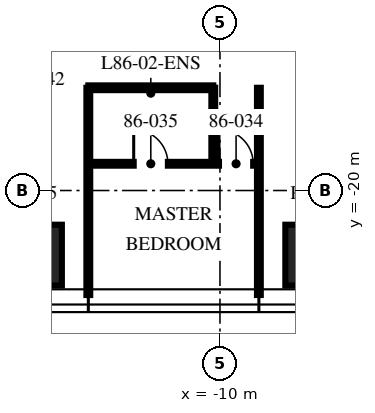
"""IFC4 building model, lengths in metres.
Left out: names, types, materials, properties, quantities, classifications, styles, units other than length and angle.
Written with IfcOpenShell. Run it as: python <this file> out.ifc"""

import sys

from ifc_helpers import new_model, si_unit, direction, frame, frame_2d, origin, origin_2d, place, context, subcontext, project, spatial, rectangle, extrude, element, fill, save


model = new_model("IFC4")
c1 = context("Model", 3, precision=1e-05, world=origin(), true_north=direction((0.0, 1.0)))
c2 = subcontext(c1, "Body", "Model", "MODEL_VIEW")
j1 = project(units=[si_unit("LENGTHUNIT", "METRE"), si_unit("PLANEANGLEUNIT", "RADIAN")], contexts=[c1])
p1 = place(None, origin())
s1 = spatial("IfcSite", under=j1, at=p1, CompositionType="ELEMENT")
p2 = place(p1, origin())
s2 = spatial("IfcBuilding", under=s1, at=p2, CompositionType="ELEMENT")
p3 = place(p2, frame((0.0, 0.0, 342.0)))
s3 = spatial("IfcBuildingStorey", under=s2, at=p3, CompositionType="ELEMENT", Elevation=342.0)
for number, where, z_axis, x_axis in (
    (1, (-7.48, -21.7, 0.0), (0.0, 0.0, 1.0), (1.0, 0.0, 0.0)),
    (2, (-14.96, -21.7, 0.0), (0.0, 0.0, 1.0), (1.0, 0.0, 0.0)),
):
    element("IfcColumn", number, at=place(p3, frame(where, z_axis=z_axis, x_axis=x_axis)), inside=s3, PredefinedType="COLUMN", context=c2, shape_type="SweptSolid", body=[
        extrude(rectangle(XDim=1.6, YDim=1.6, at=origin_2d()), origin(), (0.0, 0.0, 1.0), 3.75),
    ])
for number, where, z_axis, x_axis in (
    (3, (-13.464, -17.296, 0.0), (0.0, 0.0, 1.0), (0.0, -1.0, 0.0)),
    (4, (-8.976, -17.296, 0.0), (0.0, 0.0, 1.0), (0.0, -1.0, 0.0)),
):
    element("IfcWall", number, at=place(p3, frame(where, z_axis=z_axis, x_axis=x_axis)), inside=s3, PredefinedType="PARTITIONING", context=c2, shape_type="SweptSolid", body=[
        extrude(rectangle(XDim=5.454, YDim=0.1, at=frame_2d((2.727, 0.0))), origin(), (0.0, 0.0, 1.0), 3.01),
    ])
p4 = place(p3, frame((-13.464, -19.296, 0.0), z_axis=(0.0, 0.0, 1.0), x_axis=(1.0, 0.0, 0.0)))
e5 = element("IfcWall", 5, at=p4, inside=s3, PredefinedType="PARTITIONING", context=c2, shape_type="SweptSolid", body=[
    extrude(rectangle(XDim=4.488, YDim=0.1, at=frame_2d((2.244, 0.0))), origin(), (0.0, 0.0, 1.0), 2.91),
])
p5 = place(p4, frame((3.438, 0.0, 0.0)))
e6 = element("IfcOpeningElement", 6, at=p5, cuts=e5, PredefinedType="OPENING", context=c2, shape_type="SweptSolid", body=[
    extrude(rectangle(XDim=0.9, YDim=2.1, at=frame_2d((0.45, 1.05))), frame((0.0, 0.06, 0.0), z_axis=(0.0, -1.0, 0.0), x_axis=(1.0, 0.0, 0.0)), (0.0, 0.0, 1.0), 0.12),
])
p6 = place(p4, frame((1.194, 0.0, 0.0)))
e7 = element("IfcOpeningElement", 7, at=p6, cuts=e5, PredefinedType="OPENING", context=c2, shape_type="SweptSolid", body=[
    extrude(rectangle(XDim=0.9, YDim=2.1, at=frame_2d((0.45, 1.05))), frame((0.0, 0.06, 0.0), z_axis=(0.0, -1.0, 0.0), x_axis=(1.0, 0.0, 0.0)), (0.0, 0.0, 1.0), 0.12),
])
p7 = place(p3, frame((-10.176, -17.296, 0.0), z_axis=(0.0, 0.0, 1.0), x_axis=(0.0, -1.0, 0.0)))
e8 = element("IfcWall", 8, at=p7, inside=s3, PredefinedType="PARTITIONING", context=c2, shape_type="SweptSolid", body=[
    extrude(rectangle(XDim=2.0, YDim=0.1, at=frame_2d((1.0, 0.0))), origin(), (0.0, 0.0, 1.0), 3.5),
])
p8 = place(p3, frame((-13.464, -17.296, 0.0), z_axis=(0.0, 0.0, 1.0), x_axis=(1.0, 0.0, 0.0)))
e9 = element("IfcWall", 9, at=p8, inside=s3, PredefinedType="PARTITIONING", context=c2, shape_type="SweptSolid", body=[
    extrude(rectangle(XDim=3.288, YDim=0.125, at=frame_2d((1.644, 0.0))), origin(), (0.0, 0.0, 1.0), 2.91),
])
p9 = place(p5, origin())
e10 = element("IfcDoor", 10, at=p9, inside=s3, OperationType="SINGLE_SWING_LEFT", PredefinedType="DOOR", context=c2, shape_type="SweptSolid", body=[
    extrude(rectangle(XDim=0.9, YDim=2.1, at=frame_2d((0.45, 1.05))), frame((0.0, 0.025, 0.0), z_axis=(0.0, -1.0, 0.0), x_axis=(1.0, 0.0, 0.0)), (0.0, 0.0, 1.0), 0.05),
])
fill(e6, e10)
p10 = place(p6, origin())
e11 = element("IfcDoor", 11, at=p10, inside=s3, OperationType="SINGLE_SWING_LEFT", PredefinedType="DOOR", context=c2, shape_type="SweptSolid", body=[
    extrude(rectangle(XDim=0.9, YDim=2.1, at=frame_2d((0.45, 1.05))), frame((0.0, 0.025, 0.0), z_axis=(0.0, -1.0, 0.0), x_axis=(1.0, 0.0, 0.0)), (0.0, 0.0, 1.0), 0.05),
])
fill(e7, e11)
save(model, sys.argv[1])
